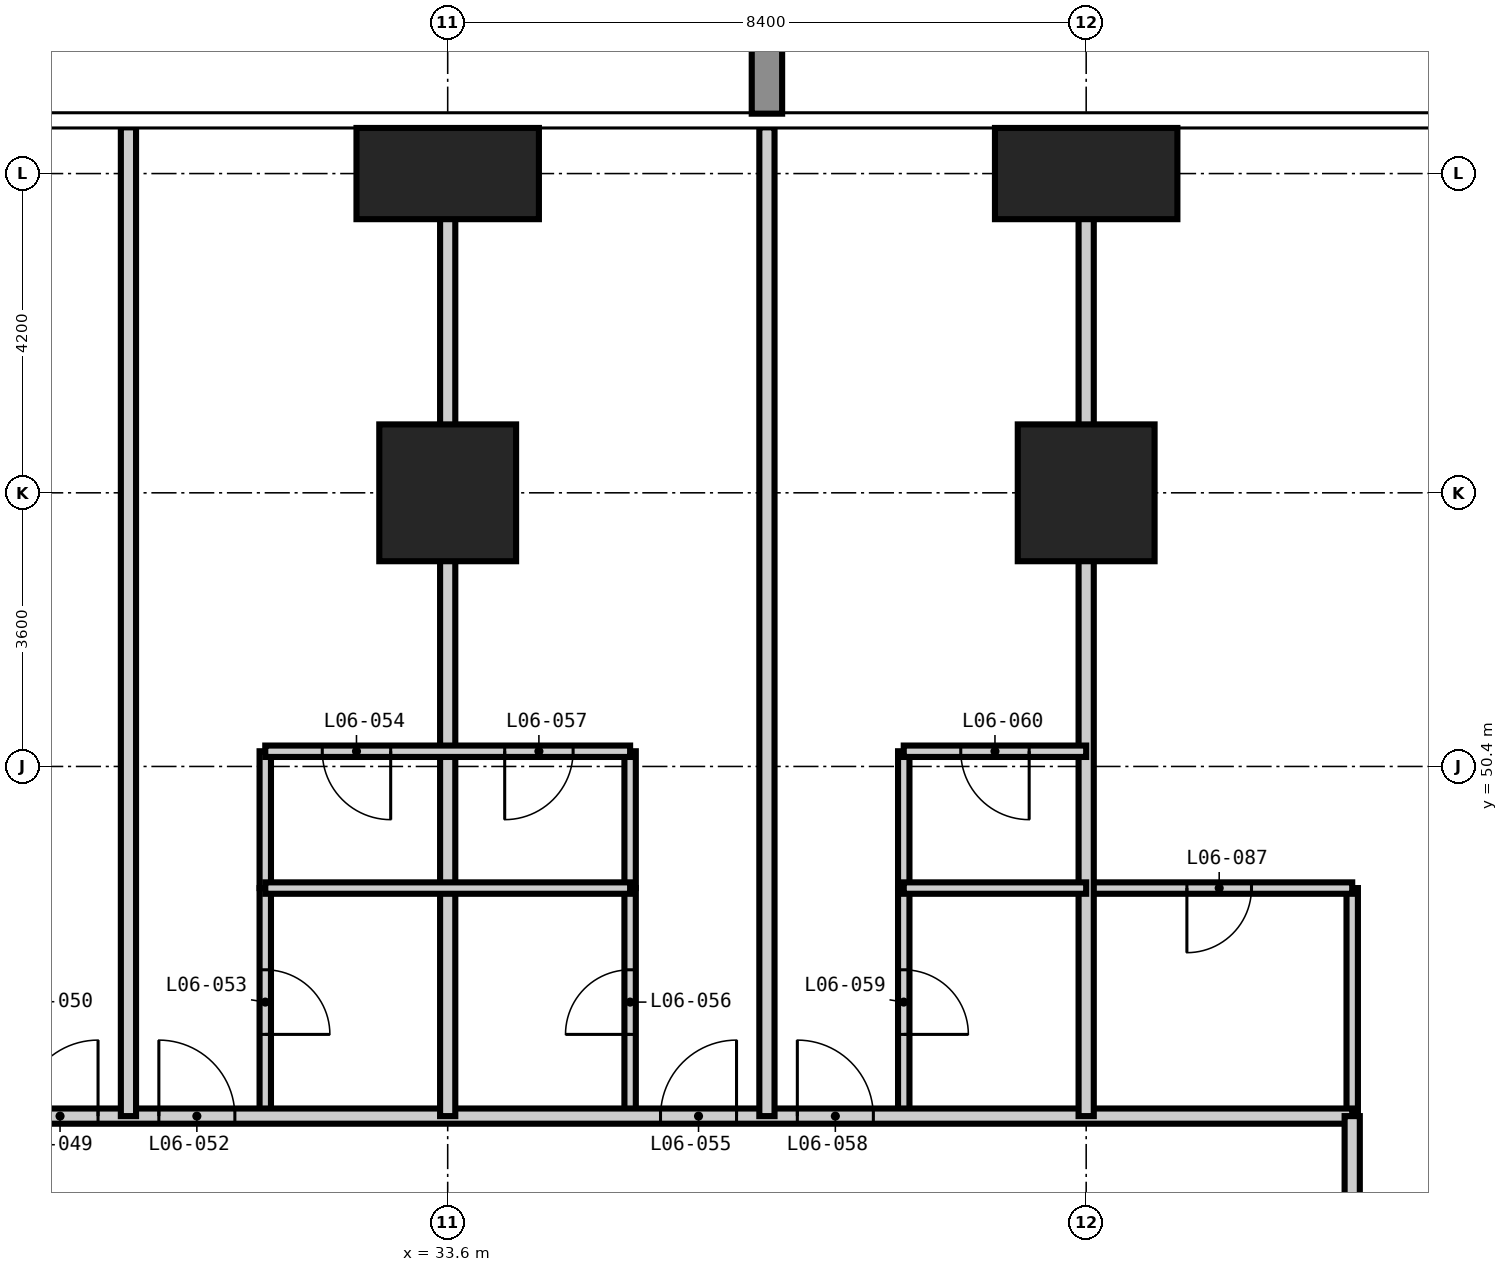
"""IFC4 building model, lengths in metres.
Left out: names, types, materials, properties, quantities, classifications, styles, units other than length and angle.
Written with IfcOpenShell. Run it as: python <this file> out.ifc"""

import sys

from ifc_helpers import new_model, si_unit, direction, frame, frame_2d, origin, origin_2d, place, context, subcontext, project, spatial, rectangle, extrude, element, fill, save


model = new_model("IFC4")
c1 = context("Model", 3, precision=1e-05, world=origin(), true_north=direction((0.0, 1.0)))
c2 = subcontext(c1, "Body", "Model", "MODEL_VIEW")
j1 = project(units=[si_unit("LENGTHUNIT", "METRE"), si_unit("PLANEANGLEUNIT", "RADIAN")], contexts=[c1])
p1 = place(None, origin())
s1 = spatial("IfcSite", under=j1, at=p1, CompositionType="ELEMENT")
p2 = place(p1, origin())
s2 = spatial("IfcBuilding", under=s1, at=p2, CompositionType="ELEMENT")
p3 = place(p2, frame((0.0, 0.0, 30.6)))
s3 = spatial("IfcBuildingStorey", under=s2, at=p3, CompositionType="ELEMENT", Elevation=30.6)
p4 = place(p3, frame((33.6, 54.0, -0.35), z_axis=(0.0, 0.0, 1.0), x_axis=(1.0, 0.0, 0.0)))
e1 = element("IfcColumn", 1, at=p4, inside=s3, PredefinedType="COLUMN", context=c2, shape_type="SweptSolid", body=[
    extrude(rectangle(XDim=1.8, YDim=1.8, at=origin_2d()), origin(), (0.0, 0.0, 1.0), 3.6),
])
p5 = place(p3, frame((33.6, 58.2, -0.35), z_axis=(0.0, 0.0, 1.0), x_axis=(1.0, 0.0, 0.0)))
e2 = element("IfcColumn", 2, at=p5, inside=s3, PredefinedType="COLUMN", context=c2, shape_type="SweptSolid", body=[
    extrude(rectangle(XDim=2.4, YDim=1.2, at=origin_2d()), origin(), (0.0, 0.0, 1.0), 3.6),
])
p6 = place(p3, frame((42.0, 54.0, -0.35), z_axis=(0.0, 0.0, 1.0), x_axis=(1.0, 0.0, 0.0)))
e3 = element("IfcColumn", 3, at=p6, inside=s3, PredefinedType="COLUMN", context=c2, shape_type="SweptSolid", body=[
    extrude(rectangle(XDim=1.8, YDim=1.8, at=origin_2d()), origin(), (0.0, 0.0, 1.0), 3.6),
])
p7 = place(p3, frame((42.0, 58.2, -0.35), z_axis=(0.0, 0.0, 1.0), x_axis=(1.0, 0.0, 0.0)))
e4 = element("IfcColumn", 4, at=p7, inside=s3, PredefinedType="COLUMN", context=c2, shape_type="SweptSolid", body=[
    extrude(rectangle(XDim=2.4, YDim=1.2, at=origin_2d()), origin(), (0.0, 0.0, 1.0), 3.6),
])
p8 = place(p3, frame((31.2, 45.8, 0.0), z_axis=(0.0, 0.0, 1.0), x_axis=(0.0, 1.0, 0.0)))
e5 = element("IfcWall", 5, at=p8, inside=s3, PredefinedType="PARTITIONING", context=c2, shape_type="SweptSolid", body=[
    extrude(rectangle(XDim=3.0, YDim=0.15, at=frame_2d((1.5, 0.0))), origin(), (0.0, 0.0, 1.0), 3.25),
])
p9 = place(p8, frame((1.075, 0.0, 0.0)))
e6 = element("IfcOpeningElement", 6, at=p9, cuts=e5, PredefinedType="OPENING", context=c2, shape_type="SweptSolid", body=[
    extrude(rectangle(XDim=0.85, YDim=2.1, at=frame_2d((0.425, 1.05))), frame((0.0, 0.085, 0.0), z_axis=(0.0, -1.0, 0.0), x_axis=(1.0, 0.0, 0.0)), (0.0, 0.0, 1.0), 0.17),
])
p10 = place(p3, frame((36.0, 45.8, 0.0), z_axis=(0.0, 0.0, 1.0), x_axis=(0.0, 1.0, 0.0)))
e7 = element("IfcWall", 7, at=p10, inside=s3, PredefinedType="PARTITIONING", context=c2, shape_type="SweptSolid", body=[
    extrude(rectangle(XDim=3.0, YDim=0.15, at=frame_2d((1.5, 0.0))), origin(), (0.0, 0.0, 1.0), 3.25),
])
p11 = place(p10, frame((1.075, 0.0, 0.0)))
e8 = element("IfcOpeningElement", 8, at=p11, cuts=e7, PredefinedType="OPENING", context=c2, shape_type="SweptSolid", body=[
    extrude(rectangle(XDim=0.85, YDim=2.1, at=frame_2d((0.425, 1.05))), frame((0.0, 0.085, 0.0), z_axis=(0.0, -1.0, 0.0), x_axis=(1.0, 0.0, 0.0)), (0.0, 0.0, 1.0), 0.17),
])
p12 = place(p3, frame((39.6, 45.8, 0.0), z_axis=(0.0, 0.0, 1.0), x_axis=(0.0, 1.0, 0.0)))
e9 = element("IfcWall", 9, at=p12, inside=s3, PredefinedType="PARTITIONING", context=c2, shape_type="SweptSolid", body=[
    extrude(rectangle(XDim=3.0, YDim=0.15, at=frame_2d((1.5, 0.0))), origin(), (0.0, 0.0, 1.0), 3.25),
])
p13 = place(p12, frame((1.075, 0.0, 0.0)))
e10 = element("IfcOpeningElement", 10, at=p13, cuts=e9, PredefinedType="OPENING", context=c2, shape_type="SweptSolid", body=[
    extrude(rectangle(XDim=0.85, YDim=2.1, at=frame_2d((0.425, 1.05))), frame((0.0, 0.085, 0.0), z_axis=(0.0, -1.0, 0.0), x_axis=(1.0, 0.0, 0.0)), (0.0, 0.0, 1.0), 0.17),
])
p14 = place(p3, frame((45.5, 45.8, 0.0), z_axis=(0.0, 0.0, 1.0), x_axis=(0.0, 1.0, 0.0)))
e11 = element("IfcWall", 11, at=p14, inside=s3, PredefinedType="PARTITIONING", context=c2, shape_type="SweptSolid", body=[
    extrude(rectangle(XDim=3.0, YDim=0.15, at=frame_2d((1.5, 0.0))), origin(), (0.0, 0.0, 1.0), 3.25),
])
p15 = place(p3, frame((42.0, 48.8, 0.0), z_axis=(0.0, 0.0, 1.0), x_axis=(1.0, 0.0, 0.0)))
e12 = element("IfcWall", 12, at=p15, inside=s3, PredefinedType="PARTITIONING", context=c2, shape_type="SweptSolid", body=[
    extrude(rectangle(XDim=3.5, YDim=0.15, at=frame_2d((1.75, 0.0))), origin(), (0.0, 0.0, 1.0), 3.25),
])
p16 = place(p15, frame((1.325, 0.0, 0.0)))
e13 = element("IfcOpeningElement", 13, at=p16, cuts=e12, PredefinedType="OPENING", context=c2, shape_type="SweptSolid", body=[
    extrude(rectangle(XDim=0.85, YDim=2.1, at=frame_2d((0.425, 1.05))), frame((0.0, 0.085, 0.0), z_axis=(0.0, -1.0, 0.0), x_axis=(1.0, 0.0, 0.0)), (0.0, 0.0, 1.0), 0.17),
])
p17 = place(p3, frame((13.6, 45.8, 0.0), z_axis=(0.0, 0.0, 1.0), x_axis=(1.0, 0.0, 0.0)))
e14 = element("IfcWall", 14, at=p17, inside=s3, PredefinedType="PARTITIONING", context=c2, shape_type="SweptSolid", body=[
    extrude(rectangle(XDim=31.9, YDim=0.2, at=frame_2d((15.95, 0.0))), origin(), (0.0, 0.0, 1.0), 3.25),
])
p18 = place(p17, frame((6.0, 0.0, 0.0)))
e15 = element("IfcOpeningElement", 15, at=p18, cuts=e14, PredefinedType="OPENING", context=c2, shape_type="SweptSolid", body=[
    extrude(rectangle(XDim=1.0, YDim=2.2, at=frame_2d((0.5, 1.1))), frame((0.0, 0.11, 0.0), z_axis=(0.0, -1.0, 0.0), x_axis=(1.0, 0.0, 0.0)), (0.0, 0.0, 1.0), 0.22),
])
p19 = place(p17, frame((7.8, 0.0, 0.0)))
e16 = element("IfcOpeningElement", 16, at=p19, cuts=e14, PredefinedType="OPENING", context=c2, shape_type="SweptSolid", body=[
    extrude(rectangle(XDim=1.0, YDim=2.2, at=frame_2d((0.5, 1.1))), frame((0.0, 0.11, 0.0), z_axis=(0.0, -1.0, 0.0), x_axis=(1.0, 0.0, 0.0)), (0.0, 0.0, 1.0), 0.22),
])
p20 = place(p17, frame((14.4, 0.0, 0.0)))
e17 = element("IfcOpeningElement", 17, at=p20, cuts=e14, PredefinedType="OPENING", context=c2, shape_type="SweptSolid", body=[
    extrude(rectangle(XDim=1.0, YDim=2.2, at=frame_2d((0.5, 1.1))), frame((0.0, 0.11, 0.0), z_axis=(0.0, -1.0, 0.0), x_axis=(1.0, 0.0, 0.0)), (0.0, 0.0, 1.0), 0.22),
])
p21 = place(p17, frame((16.2, 0.0, 0.0)))
e18 = element("IfcOpeningElement", 18, at=p21, cuts=e14, PredefinedType="OPENING", context=c2, shape_type="SweptSolid", body=[
    extrude(rectangle(XDim=1.0, YDim=2.2, at=frame_2d((0.5, 1.1))), frame((0.0, 0.11, 0.0), z_axis=(0.0, -1.0, 0.0), x_axis=(1.0, 0.0, 0.0)), (0.0, 0.0, 1.0), 0.22),
])
p22 = place(p17, frame((22.8, 0.0, 0.0)))
e19 = element("IfcOpeningElement", 19, at=p22, cuts=e14, PredefinedType="OPENING", context=c2, shape_type="SweptSolid", body=[
    extrude(rectangle(XDim=1.0, YDim=2.2, at=frame_2d((0.5, 1.1))), frame((0.0, 0.11, 0.0), z_axis=(0.0, -1.0, 0.0), x_axis=(1.0, 0.0, 0.0)), (0.0, 0.0, 1.0), 0.22),
])
p23 = place(p17, frame((24.6, 0.0, 0.0)))
e20 = element("IfcOpeningElement", 20, at=p23, cuts=e14, PredefinedType="OPENING", context=c2, shape_type="SweptSolid", body=[
    extrude(rectangle(XDim=1.0, YDim=2.2, at=frame_2d((0.5, 1.1))), frame((0.0, 0.11, 0.0), z_axis=(0.0, -1.0, 0.0), x_axis=(1.0, 0.0, 0.0)), (0.0, 0.0, 1.0), 0.22),
])
p24 = place(p3, frame((45.5, 45.8, 0.0), z_axis=(0.0, 0.0, 1.0), x_axis=(0.0, -1.0, 0.0)))
e21 = element("IfcWall", 21, at=p24, inside=s3, PredefinedType="PARTITIONING", context=c2, shape_type="SweptSolid", body=[
    extrude(rectangle(XDim=32.2, YDim=0.2, at=frame_2d((16.1, 0.0))), origin(), (0.0, 0.0, 1.0), 3.25),
])
p25 = place(p24, frame((26.4, 0.0, 0.0)))
e22 = element("IfcOpeningElement", 22, at=p25, cuts=e21, PredefinedType="OPENING", context=c2, shape_type="SweptSolid", body=[
    extrude(rectangle(XDim=1.0, YDim=2.2, at=frame_2d((0.5, 1.1))), frame((0.0, 0.11, 0.0), z_axis=(0.0, -1.0, 0.0), x_axis=(1.0, 0.0, 0.0)), (0.0, 0.0, 1.0), 0.22),
])
p26 = place(p24, frame((22.2, 0.0, 0.0)))
e23 = element("IfcOpeningElement", 23, at=p26, cuts=e21, PredefinedType="OPENING", context=c2, shape_type="SweptSolid", body=[
    extrude(rectangle(XDim=1.0, YDim=2.2, at=frame_2d((0.5, 1.1))), frame((0.0, 0.11, 0.0), z_axis=(0.0, -1.0, 0.0), x_axis=(1.0, 0.0, 0.0)), (0.0, 0.0, 1.0), 0.22),
])
p27 = place(p24, frame((16.8, 0.0, 0.0)))
e24 = element("IfcOpeningElement", 24, at=p27, cuts=e21, PredefinedType="OPENING", context=c2, shape_type="SweptSolid", body=[
    extrude(rectangle(XDim=1.0, YDim=2.2, at=frame_2d((0.5, 1.1))), frame((0.0, 0.11, 0.0), z_axis=(0.0, -1.0, 0.0), x_axis=(1.0, 0.0, 0.0)), (0.0, 0.0, 1.0), 0.22),
])
p28 = place(p24, frame((15.0, 0.0, 0.0)))
e25 = element("IfcOpeningElement", 25, at=p28, cuts=e21, PredefinedType="OPENING", context=c2, shape_type="SweptSolid", body=[
    extrude(rectangle(XDim=1.0, YDim=2.2, at=frame_2d((0.5, 1.1))), frame((0.0, 0.11, 0.0), z_axis=(0.0, -1.0, 0.0), x_axis=(1.0, 0.0, 0.0)), (0.0, 0.0, 1.0), 0.22),
])
p29 = place(p24, frame((8.4, 0.0, 0.0)))
e26 = element("IfcOpeningElement", 26, at=p29, cuts=e21, PredefinedType="OPENING", context=c2, shape_type="SweptSolid", body=[
    extrude(rectangle(XDim=1.0, YDim=2.2, at=frame_2d((0.5, 1.1))), frame((0.0, 0.11, 0.0), z_axis=(0.0, -1.0, 0.0), x_axis=(1.0, 0.0, 0.0)), (0.0, 0.0, 1.0), 0.22),
])
p30 = place(p24, frame((6.6, 0.0, 0.0)))
e27 = element("IfcOpeningElement", 27, at=p30, cuts=e21, PredefinedType="OPENING", context=c2, shape_type="SweptSolid", body=[
    extrude(rectangle(XDim=1.0, YDim=2.2, at=frame_2d((0.5, 1.1))), frame((0.0, 0.11, 0.0), z_axis=(0.0, -1.0, 0.0), x_axis=(1.0, 0.0, 0.0)), (0.0, 0.0, 1.0), 0.22),
])
p31 = place(p24, frame((30.1, 0.0, 0.0)))
e28 = element("IfcOpeningElement", 28, at=p31, cuts=e21, PredefinedType="OPENING", context=c2, shape_type="SweptSolid", body=[
    extrude(rectangle(XDim=1.0, YDim=2.2, at=frame_2d((0.5, 1.1))), frame((0.0, 0.11, 0.0), z_axis=(0.0, -1.0, 0.0), x_axis=(1.0, 0.0, 0.0)), (0.0, 0.0, 1.0), 0.22),
])
p32 = place(p24, frame((1.4, 0.0, 0.0)))
e29 = element("IfcOpeningElement", 29, at=p32, cuts=e21, PredefinedType="OPENING", context=c2, shape_type="SweptSolid", body=[
    extrude(rectangle(XDim=1.0, YDim=2.2, at=frame_2d((0.5, 1.1))), frame((0.0, 0.11, 0.0), z_axis=(0.0, -1.0, 0.0), x_axis=(1.0, 0.0, 0.0)), (0.0, 0.0, 1.0), 0.22),
])
for number, where, z_axis, x_axis in (
    (30, (29.4, 45.8, 0.0), (0.0, 0.0, 1.0), (0.0, 1.0, 0.0)),
    (31, (33.6, 45.8, 0.0), (0.0, 0.0, 1.0), (0.0, 1.0, 0.0)),
    (32, (37.8, 45.8, 0.0), (0.0, 0.0, 1.0), (0.0, 1.0, 0.0)),
    (33, (42.0, 45.8, 0.0), (0.0, 0.0, 1.0), (0.0, 1.0, 0.0)),
):
    element("IfcWall", number, at=place(p3, frame(where, z_axis=z_axis, x_axis=x_axis)), inside=s3, PredefinedType="PARTITIONING", context=c2, shape_type="SweptSolid", body=[
        extrude(rectangle(XDim=13.008, YDim=0.2, at=frame_2d((6.504, 0.0))), origin(), (0.0, 0.0, 1.0), 3.25),
    ])
for number, where, z_axis, x_axis in (
    (34, (31.2, 48.8, 0.0), (0.0, 0.0, 1.0), (0.0, 1.0, 0.0)),
    (35, (36.0, 48.8, 0.0), (0.0, 0.0, 1.0), (0.0, 1.0, 0.0)),
    (36, (39.6, 48.8, 0.0), (0.0, 0.0, 1.0), (0.0, 1.0, 0.0)),
):
    element("IfcWall", number, at=place(p3, frame(where, z_axis=z_axis, x_axis=x_axis)), inside=s3, PredefinedType="PARTITIONING", context=c2, shape_type="SweptSolid", body=[
        extrude(rectangle(XDim=1.8, YDim=0.15, at=frame_2d((0.9, 0.0))), origin(), (0.0, 0.0, 1.0), 3.25),
    ])
p33 = place(p3, frame((31.2, 48.8, 0.0), z_axis=(0.0, 0.0, 1.0), x_axis=(1.0, 0.0, 0.0)))
e37 = element("IfcWall", 37, at=p33, inside=s3, PredefinedType="PARTITIONING", context=c2, shape_type="SweptSolid", body=[
    extrude(rectangle(XDim=4.8, YDim=0.15, at=frame_2d((2.4, 0.0))), origin(), (0.0, 0.0, 1.0), 3.25),
])
p34 = place(p3, frame((39.6, 48.8, 0.0), z_axis=(0.0, 0.0, 1.0), x_axis=(1.0, 0.0, 0.0)))
e38 = element("IfcWall", 38, at=p34, inside=s3, PredefinedType="PARTITIONING", context=c2, shape_type="SweptSolid", body=[
    extrude(rectangle(XDim=2.4, YDim=0.15, at=frame_2d((1.2, 0.0))), origin(), (0.0, 0.0, 1.0), 3.25),
])
p35 = place(p3, frame((31.2, 50.6, 0.0), z_axis=(0.0, 0.0, 1.0), x_axis=(1.0, 0.0, 0.0)))
e39 = element("IfcWall", 39, at=p35, inside=s3, PredefinedType="PARTITIONING", context=c2, shape_type="SweptSolid", body=[
    extrude(rectangle(XDim=4.8, YDim=0.15, at=frame_2d((2.4, 0.0))), origin(), (0.0, 0.0, 1.0), 3.25),
])
p36 = place(p35, frame((0.75, 0.0, 0.0)))
e40 = element("IfcOpeningElement", 40, at=p36, cuts=e39, PredefinedType="OPENING", context=c2, shape_type="SweptSolid", body=[
    extrude(rectangle(XDim=0.9, YDim=2.1, at=frame_2d((0.45, 1.05))), frame((0.0, 0.085, 0.0), z_axis=(0.0, -1.0, 0.0), x_axis=(1.0, 0.0, 0.0)), (0.0, 0.0, 1.0), 0.17),
])
p37 = place(p35, frame((3.15, 0.0, 0.0)))
e41 = element("IfcOpeningElement", 41, at=p37, cuts=e39, PredefinedType="OPENING", context=c2, shape_type="SweptSolid", body=[
    extrude(rectangle(XDim=0.9, YDim=2.1, at=frame_2d((0.45, 1.05))), frame((0.0, 0.085, 0.0), z_axis=(0.0, -1.0, 0.0), x_axis=(1.0, 0.0, 0.0)), (0.0, 0.0, 1.0), 0.17),
])
p38 = place(p3, frame((39.6, 50.6, 0.0), z_axis=(0.0, 0.0, 1.0), x_axis=(1.0, 0.0, 0.0)))
e42 = element("IfcWall", 42, at=p38, inside=s3, PredefinedType="PARTITIONING", context=c2, shape_type="SweptSolid", body=[
    extrude(rectangle(XDim=2.4, YDim=0.15, at=frame_2d((1.2, 0.0))), origin(), (0.0, 0.0, 1.0), 3.25),
])
p39 = place(p38, frame((0.75, 0.0, 0.0)))
e43 = element("IfcOpeningElement", 43, at=p39, cuts=e42, PredefinedType="OPENING", context=c2, shape_type="SweptSolid", body=[
    extrude(rectangle(XDim=0.9, YDim=2.1, at=frame_2d((0.45, 1.05))), frame((0.0, 0.085, 0.0), z_axis=(0.0, -1.0, 0.0), x_axis=(1.0, 0.0, 0.0)), (0.0, 0.0, 1.0), 0.17),
])
p40 = place(p20, origin())
e44 = element("IfcDoor", 44, at=p40, inside=s3, OperationType="SINGLE_SWING_RIGHT", PredefinedType="DOOR", context=c2, shape_type="SweptSolid", body=[
    extrude(rectangle(XDim=1.0, YDim=2.2, at=frame_2d((0.5, 1.1))), frame((0.0, 0.025, 0.0), z_axis=(0.0, -1.0, 0.0), x_axis=(1.0, 0.0, 0.0)), (0.0, 0.0, 1.0), 0.05),
])
fill(e17, e44)
p41 = place(p21, origin())
e45 = element("IfcDoor", 45, at=p41, inside=s3, OperationType="SINGLE_SWING_LEFT", PredefinedType="DOOR", context=c2, shape_type="SweptSolid", body=[
    extrude(rectangle(XDim=1.0, YDim=2.2, at=frame_2d((0.5, 1.1))), frame((0.0, 0.025, 0.0), z_axis=(0.0, -1.0, 0.0), x_axis=(1.0, 0.0, 0.0)), (0.0, 0.0, 1.0), 0.05),
])
fill(e18, e45)
p42 = place(p9, frame((0.85, 0.0, 0.0), z_axis=(0.0, 0.0, 1.0), x_axis=(-1.0, 0.0, 0.0)))
e46 = element("IfcDoor", 46, at=p42, inside=s3, OperationType="SINGLE_SWING_RIGHT", PredefinedType="DOOR", context=c2, shape_type="SweptSolid", body=[
    extrude(rectangle(XDim=0.85, YDim=2.1, at=frame_2d((0.425, 1.05))), frame((0.0, 0.025, 0.0), z_axis=(0.0, -1.0, 0.0), x_axis=(1.0, 0.0, 0.0)), (0.0, 0.0, 1.0), 0.05),
])
fill(e6, e46)
p43 = place(p36, frame((0.9, 0.0, 0.0), z_axis=(0.0, 0.0, 1.0), x_axis=(-1.0, 0.0, 0.0)))
e47 = element("IfcDoor", 47, at=p43, inside=s3, OperationType="SINGLE_SWING_LEFT", PredefinedType="DOOR", context=c2, shape_type="SweptSolid", body=[
    extrude(rectangle(XDim=0.9, YDim=2.1, at=frame_2d((0.45, 1.05))), frame((0.0, 0.025, 0.0), z_axis=(0.0, -1.0, 0.0), x_axis=(1.0, 0.0, 0.0)), (0.0, 0.0, 1.0), 0.05),
])
fill(e40, e47)
p44 = place(p22, origin())
e48 = element("IfcDoor", 48, at=p44, inside=s3, OperationType="SINGLE_SWING_RIGHT", PredefinedType="DOOR", context=c2, shape_type="SweptSolid", body=[
    extrude(rectangle(XDim=1.0, YDim=2.2, at=frame_2d((0.5, 1.1))), frame((0.0, 0.025, 0.0), z_axis=(0.0, -1.0, 0.0), x_axis=(1.0, 0.0, 0.0)), (0.0, 0.0, 1.0), 0.05),
])
fill(e19, e48)
p45 = place(p11, origin())
e49 = element("IfcDoor", 49, at=p45, inside=s3, OperationType="SINGLE_SWING_LEFT", PredefinedType="DOOR", context=c2, shape_type="SweptSolid", body=[
    extrude(rectangle(XDim=0.85, YDim=2.1, at=frame_2d((0.425, 1.05))), frame((0.0, 0.025, 0.0), z_axis=(0.0, -1.0, 0.0), x_axis=(1.0, 0.0, 0.0)), (0.0, 0.0, 1.0), 0.05),
])
fill(e8, e49)
p46 = place(p37, frame((0.9, 0.0, 0.0), z_axis=(0.0, 0.0, 1.0), x_axis=(-1.0, 0.0, 0.0)))
e50 = element("IfcDoor", 50, at=p46, inside=s3, OperationType="SINGLE_SWING_RIGHT", PredefinedType="DOOR", context=c2, shape_type="SweptSolid", body=[
    extrude(rectangle(XDim=0.9, YDim=2.1, at=frame_2d((0.45, 1.05))), frame((0.0, 0.025, 0.0), z_axis=(0.0, -1.0, 0.0), x_axis=(1.0, 0.0, 0.0)), (0.0, 0.0, 1.0), 0.05),
])
fill(e41, e50)
p47 = place(p23, origin())
e51 = element("IfcDoor", 51, at=p47, inside=s3, OperationType="SINGLE_SWING_LEFT", PredefinedType="DOOR", context=c2, shape_type="SweptSolid", body=[
    extrude(rectangle(XDim=1.0, YDim=2.2, at=frame_2d((0.5, 1.1))), frame((0.0, 0.025, 0.0), z_axis=(0.0, -1.0, 0.0), x_axis=(1.0, 0.0, 0.0)), (0.0, 0.0, 1.0), 0.05),
])
fill(e20, e51)
p48 = place(p13, frame((0.85, 0.0, 0.0), z_axis=(0.0, 0.0, 1.0), x_axis=(-1.0, 0.0, 0.0)))
e52 = element("IfcDoor", 52, at=p48, inside=s3, OperationType="SINGLE_SWING_RIGHT", PredefinedType="DOOR", context=c2, shape_type="SweptSolid", body=[
    extrude(rectangle(XDim=0.85, YDim=2.1, at=frame_2d((0.425, 1.05))), frame((0.0, 0.025, 0.0), z_axis=(0.0, -1.0, 0.0), x_axis=(1.0, 0.0, 0.0)), (0.0, 0.0, 1.0), 0.05),
])
fill(e10, e52)
p49 = place(p39, frame((0.9, 0.0, 0.0), z_axis=(0.0, 0.0, 1.0), x_axis=(-1.0, 0.0, 0.0)))
e53 = element("IfcDoor", 53, at=p49, inside=s3, OperationType="SINGLE_SWING_LEFT", PredefinedType="DOOR", context=c2, shape_type="SweptSolid", body=[
    extrude(rectangle(XDim=0.9, YDim=2.1, at=frame_2d((0.45, 1.05))), frame((0.0, 0.025, 0.0), z_axis=(0.0, -1.0, 0.0), x_axis=(1.0, 0.0, 0.0)), (0.0, 0.0, 1.0), 0.05),
])
fill(e43, e53)
p50 = place(p16, frame((0.85, 0.0, 0.0), z_axis=(0.0, 0.0, 1.0), x_axis=(-1.0, 0.0, 0.0)))
e54 = element("IfcDoor", 54, at=p50, inside=s3, OperationType="SINGLE_SWING_RIGHT", PredefinedType="DOOR", context=c2, shape_type="SweptSolid", body=[
    extrude(rectangle(XDim=0.85, YDim=2.1, at=frame_2d((0.425, 1.05))), frame((0.0, 0.025, 0.0), z_axis=(0.0, -1.0, 0.0), x_axis=(1.0, 0.0, 0.0)), (0.0, 0.0, 1.0), 0.05),
])
fill(e13, e54)
save(model, sys.argv[1])
